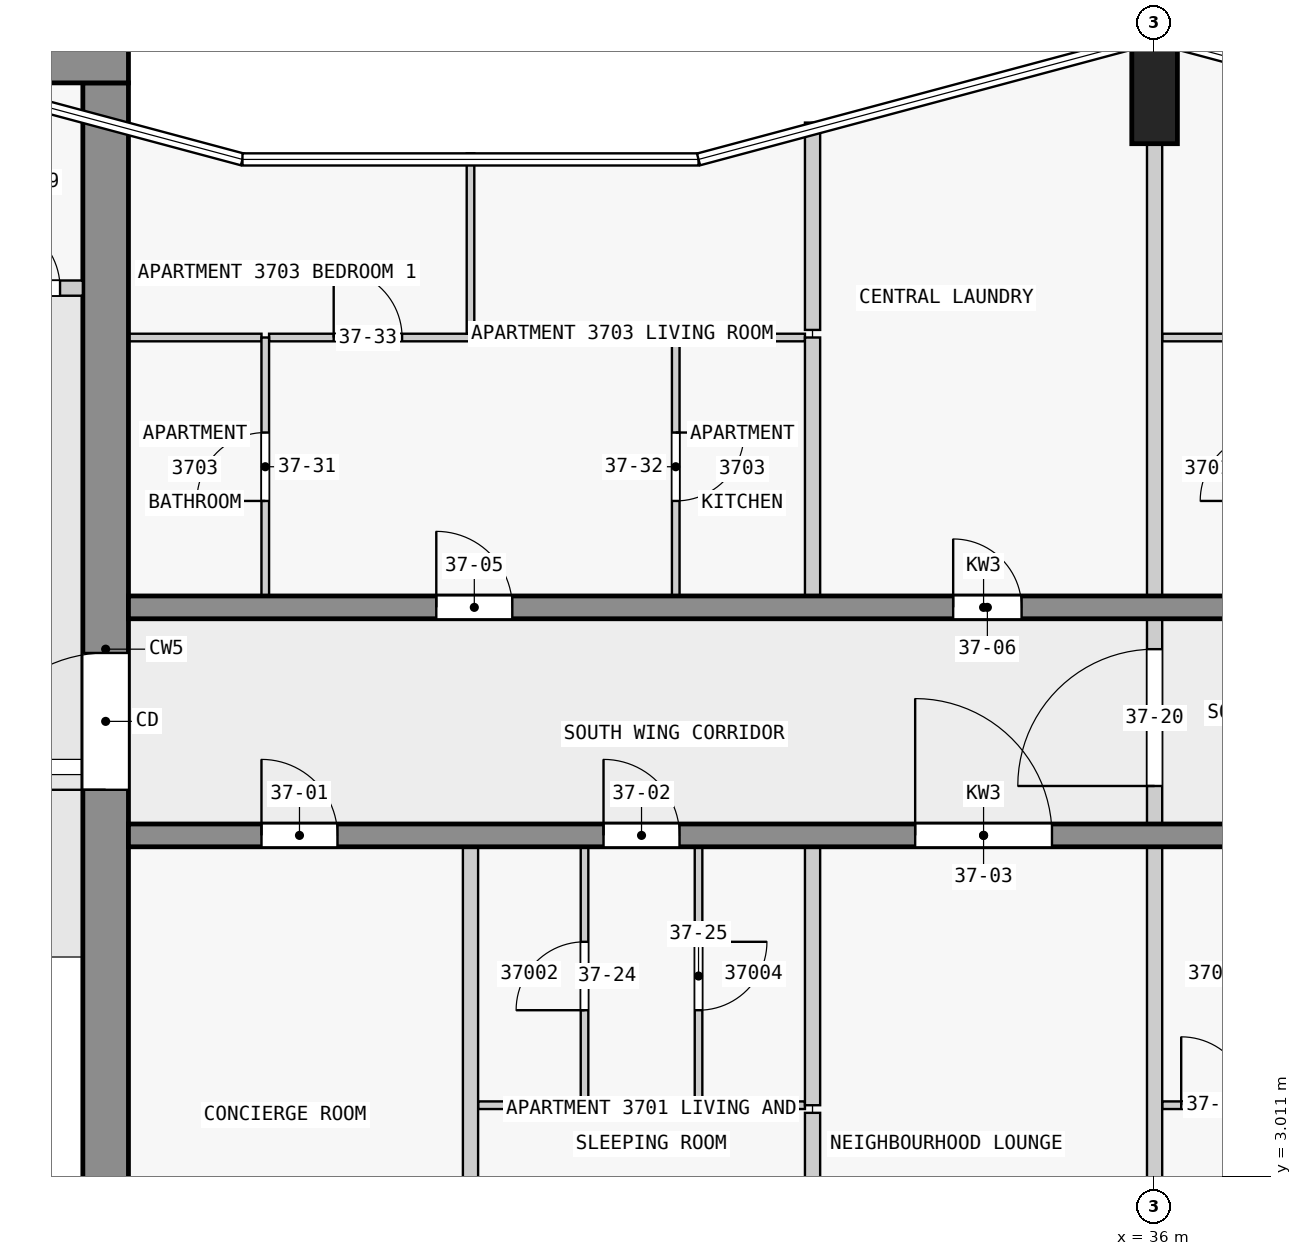
"""IFC4 building model, lengths in metres.
Left out: names, types, materials, properties, quantities, classifications, styles, units other than length and angle.
Written with IfcOpenShell. Run it as: python <this file> out.ifc"""

import sys

from ifc_helpers import new_model, si_unit, direction, frame, frame_2d, origin, origin_2d, place, context, subcontext, project, spatial, rectangle, extrude, element, fill, save


model = new_model("IFC4")
c1 = context("Model", 3, precision=1e-05, world=origin(), true_north=direction((0.0, 1.0)))
c2 = subcontext(c1, "Body", "Model", "MODEL_VIEW")
j1 = project(units=[si_unit("LENGTHUNIT", "METRE"), si_unit("PLANEANGLEUNIT", "RADIAN")], contexts=[c1])
p1 = place(None, origin())
s1 = spatial("IfcSite", under=j1, at=p1, CompositionType="ELEMENT")
p2 = place(p1, origin())
s2 = spatial("IfcBuilding", under=s1, at=p2, CompositionType="ELEMENT")
p3 = place(p2, frame((0.0, 0.0, 146.4)))
s3 = spatial("IfcBuildingStorey", under=s2, at=p3, CompositionType="ELEMENT", Elevation=146.4)
p4 = place(p3, frame((36.0, 17.3, 0.0), z_axis=(0.0, 0.0, 1.0), x_axis=(1.0, 0.0, 0.0)))
e1 = element("IfcColumn", 1, at=p4, inside=s3, PredefinedType="COLUMN", context=c2, shape_type="SweptSolid", body=[
    extrude(rectangle(XDim=0.6, YDim=1.4, at=origin_2d()), origin(), (0.0, 0.0, 1.0), 3.5),
])
p5 = place(p3, frame((1.38, 17.7, 0.0), z_axis=(0.0, 0.0, 1.0), x_axis=(1.0, 0.0, 0.0)))
e2 = element("IfcWall", 2, at=p5, inside=s3, PredefinedType="SHEAR", context=c2, shape_type="SweptSolid", body=[
    extrude(rectangle(XDim=21.12, YDim=0.6, at=frame_2d((10.56, 0.0))), origin(), (0.0, 0.0, 1.0), 3.25),
])
p6 = place(p5, frame((6.4, 0.0, 0.0)))
e3 = element("IfcOpeningElement", 3, at=p6, cuts=e2, PredefinedType="OPENING", context=c2, shape_type="SweptSolid", body=[
    extrude(rectangle(XDim=1.8, YDim=2.1, at=frame_2d((0.9, 1.05))), frame((0.0, 0.31, 0.0), z_axis=(0.0, -1.0, 0.0), x_axis=(1.0, 0.0, 0.0)), (0.0, 0.0, 1.0), 0.62),
])
p7 = place(p3, frame((22.2, 2.5, 0.0), z_axis=(0.0, 0.0, 1.0), x_axis=(0.0, 1.0, 0.0)))
e4 = element("IfcWall", 4, at=p7, inside=s3, PredefinedType="SHEAR", context=c2, shape_type="SweptSolid", body=[
    extrude(rectangle(XDim=14.9, YDim=0.6, at=frame_2d((7.45, 0.0))), origin(), (0.0, 0.0, 1.0), 3.25),
])
p8 = place(p7, frame((5.6, 0.0, 0.0)))
e5 = element("IfcOpeningElement", 5, at=p8, cuts=e4, PredefinedType="OPENING", context=c2, shape_type="SweptSolid", body=[
    extrude(rectangle(XDim=1.8, YDim=2.1, at=frame_2d((0.9, 1.05))), frame((0.0, 0.31, 0.0), z_axis=(0.0, -1.0, 0.0), x_axis=(1.0, 0.0, 0.0)), (0.0, 0.0, 1.0), 0.62),
])
p9 = place(p3, frame((22.5, 7.5, 0.0), z_axis=(0.0, 0.0, 1.0), x_axis=(1.0, 0.0, 0.0)))
e6 = element("IfcWall", 6, at=p9, inside=s3, PredefinedType="SHEAR", context=c2, shape_type="SweptSolid", body=[
    extrude(rectangle(XDim=22.5, YDim=0.3, at=frame_2d((11.25, 0.0))), origin(), (0.0, 0.0, 1.0), 3.25),
])
p10 = place(p9, frame((1.75, 0.0, 0.0)))
e7 = element("IfcOpeningElement", 7, at=p10, cuts=e6, PredefinedType="OPENING", context=c2, shape_type="SweptSolid", body=[
    extrude(rectangle(XDim=1.0, YDim=2.1, at=frame_2d((0.5, 1.05))), frame((0.0, 0.16, 0.0), z_axis=(0.0, -1.0, 0.0), x_axis=(1.0, 0.0, 0.0)), (0.0, 0.0, 1.0), 0.32),
])
p11 = place(p9, frame((6.25, 0.0, 0.0)))
e8 = element("IfcOpeningElement", 8, at=p11, cuts=e6, PredefinedType="OPENING", context=c2, shape_type="SweptSolid", body=[
    extrude(rectangle(XDim=1.0, YDim=2.1, at=frame_2d((0.5, 1.05))), frame((0.0, 0.16, 0.0), z_axis=(0.0, -1.0, 0.0), x_axis=(1.0, 0.0, 0.0)), (0.0, 0.0, 1.0), 0.32),
])
p12 = place(p9, frame((10.35, 0.0, 0.0)))
e9 = element("IfcOpeningElement", 9, at=p12, cuts=e6, PredefinedType="OPENING", context=c2, shape_type="SweptSolid", body=[
    extrude(rectangle(XDim=1.8, YDim=2.1, at=frame_2d((0.9, 1.05))), frame((0.0, 0.16, 0.0), z_axis=(0.0, -1.0, 0.0), x_axis=(1.0, 0.0, 0.0)), (0.0, 0.0, 1.0), 0.32),
])
p13 = place(p9, frame((16.85, 0.0, 0.0)))
e10 = element("IfcOpeningElement", 10, at=p13, cuts=e6, PredefinedType="OPENING", context=c2, shape_type="SweptSolid", body=[
    extrude(rectangle(XDim=1.0, YDim=2.1, at=frame_2d((0.5, 1.05))), frame((0.0, 0.16, 0.0), z_axis=(0.0, -1.0, 0.0), x_axis=(1.0, 0.0, 0.0)), (0.0, 0.0, 1.0), 0.32),
])
p14 = place(p3, frame((22.5, 10.5, 0.0), z_axis=(0.0, 0.0, 1.0), x_axis=(1.0, 0.0, 0.0)))
e11 = element("IfcWall", 11, at=p14, inside=s3, PredefinedType="SHEAR", context=c2, shape_type="SweptSolid", body=[
    extrude(rectangle(XDim=22.5, YDim=0.3, at=frame_2d((11.25, 0.0))), origin(), (0.0, 0.0, 1.0), 3.25),
])
p15 = place(p14, frame((4.05, 0.0, 0.0)))
e12 = element("IfcOpeningElement", 12, at=p15, cuts=e11, PredefinedType="OPENING", context=c2, shape_type="SweptSolid", body=[
    extrude(rectangle(XDim=1.0, YDim=2.1, at=frame_2d((0.5, 1.05))), frame((0.0, 0.16, 0.0), z_axis=(0.0, -1.0, 0.0), x_axis=(1.0, 0.0, 0.0)), (0.0, 0.0, 1.0), 0.32),
])
p16 = place(p14, frame((10.85, 0.0, 0.0)))
e13 = element("IfcOpeningElement", 13, at=p16, cuts=e11, PredefinedType="OPENING", context=c2, shape_type="SweptSolid", body=[
    extrude(rectangle(XDim=0.9, YDim=2.1, at=frame_2d((0.45, 1.05))), frame((0.0, 0.16, 0.0), z_axis=(0.0, -1.0, 0.0), x_axis=(1.0, 0.0, 0.0)), (0.0, 0.0, 1.0), 0.32),
])
p17 = place(p14, frame((15.25, 0.0, 0.0)))
e14 = element("IfcOpeningElement", 14, at=p17, cuts=e11, PredefinedType="OPENING", context=c2, shape_type="SweptSolid", body=[
    extrude(rectangle(XDim=1.0, YDim=2.1, at=frame_2d((0.5, 1.05))), frame((0.0, 0.16, 0.0), z_axis=(0.0, -1.0, 0.0), x_axis=(1.0, 0.0, 0.0)), (0.0, 0.0, 1.0), 0.32),
])
p18 = place(p14, frame((18.75, 0.0, 0.0)))
e15 = element("IfcOpeningElement", 15, at=p18, cuts=e11, PredefinedType="OPENING", context=c2, shape_type="SweptSolid", body=[
    extrude(rectangle(XDim=0.9, YDim=2.1, at=frame_2d((0.45, 1.05))), frame((0.0, 0.16, 0.0), z_axis=(0.0, -1.0, 0.0), x_axis=(1.0, 0.0, 0.0)), (0.0, 0.0, 1.0), 0.32),
])
p19 = place(p14, frame((20.95, 0.0, 0.0)))
e16 = element("IfcOpeningElement", 16, at=p19, cuts=e11, PredefinedType="OPENING", context=c2, shape_type="SweptSolid", body=[
    extrude(rectangle(XDim=1.0, YDim=2.1, at=frame_2d((0.5, 1.05))), frame((0.0, 0.16, 0.0), z_axis=(0.0, -1.0, 0.0), x_axis=(1.0, 0.0, 0.0)), (0.0, 0.0, 1.0), 0.32),
])
p20 = place(p3, frame((18.6, 14.7, 0.0), z_axis=(0.0, 0.0, 1.0), x_axis=(1.0, 0.0, 0.0)))
e17 = element("IfcWall", 17, at=p20, inside=s3, PredefinedType="PARTITIONING", context=c2, shape_type="SweptSolid", body=[
    extrude(rectangle(XDim=3.3, YDim=0.2, at=frame_2d((1.65, 0.0))), origin(), (0.0, 0.0, 1.0), 3.25),
])
p21 = place(p20, frame((0.45, 0.0, 0.0)))
e18 = element("IfcOpeningElement", 18, at=p21, cuts=e17, PredefinedType="OPENING", context=c2, shape_type="SweptSolid", body=[
    extrude(rectangle(XDim=0.9, YDim=2.1, at=frame_2d((0.45, 1.05))), frame((0.0, 0.11, 0.0), z_axis=(0.0, -1.0, 0.0), x_axis=(1.0, 0.0, 0.0)), (0.0, 0.0, 1.0), 0.22),
])
p22 = place(p20, frame((2.1, 0.0, 0.0)))
e19 = element("IfcOpeningElement", 19, at=p22, cuts=e17, PredefinedType="OPENING", context=c2, shape_type="SweptSolid", body=[
    extrude(rectangle(XDim=0.9, YDim=2.1, at=frame_2d((0.45, 1.05))), frame((0.0, 0.11, 0.0), z_axis=(0.0, -1.0, 0.0), x_axis=(1.0, 0.0, 0.0)), (0.0, 0.0, 1.0), 0.22),
])
for number, where, z_axis, x_axis in (
    (20, (27.1, 3.95, 0.0), (0.0, 0.0, 1.0), (1.0, 0.0, 0.0)),
    (21, (30.05, 3.95, 0.0), (0.0, 0.0, 1.0), (1.0, 0.0, 0.0)),
):
    element("IfcWall", number, at=place(p3, frame(where, z_axis=z_axis, x_axis=x_axis)), inside=s3, PredefinedType="PARTITIONING", context=c2, shape_type="SweptSolid", body=[
        extrude(rectangle(XDim=1.35, YDim=0.1, at=frame_2d((0.675, 0.0))), origin(), (0.0, 0.0, 1.0), 3.25),
    ])
p23 = place(p3, frame((36.1, 3.95, 0.0), z_axis=(0.0, 0.0, 1.0), x_axis=(1.0, 0.0, 0.0)))
e22 = element("IfcWall", 22, at=p23, inside=s3, PredefinedType="PARTITIONING", context=c2, shape_type="SweptSolid", body=[
    extrude(rectangle(XDim=1.45, YDim=0.1, at=frame_2d((0.725, 0.0))), origin(), (0.0, 0.0, 1.0), 3.25),
])
p24 = place(p23, frame((0.25, 0.0, 0.0)))
e23 = element("IfcOpeningElement", 23, at=p24, cuts=e22, PredefinedType="OPENING", context=c2, shape_type="SweptSolid", body=[
    extrude(rectangle(XDim=0.9, YDim=2.1, at=frame_2d((0.45, 1.05))), frame((0.0, 0.06, 0.0), z_axis=(0.0, -1.0, 0.0), x_axis=(1.0, 0.0, 0.0)), (0.0, 0.0, 1.0), 0.12),
])
p25 = place(p3, frame((24.25, 14.05, 0.0), z_axis=(0.0, 0.0, 1.0), x_axis=(-1.0, 0.0, 0.0)))
e24 = element("IfcWall", 24, at=p25, inside=s3, PredefinedType="PARTITIONING", context=c2, shape_type="SweptSolid", body=[
    extrude(rectangle(XDim=1.75, YDim=0.1, at=frame_2d((0.875, 0.0))), origin(), (0.0, 0.0, 1.0), 3.25),
])
p26 = place(p3, frame((31.4, 14.05, 0.0), z_axis=(0.0, 0.0, 1.0), x_axis=(-1.0, 0.0, 0.0)))
e25 = element("IfcWall", 25, at=p26, inside=s3, PredefinedType="PARTITIONING", context=c2, shape_type="SweptSolid", body=[
    extrude(rectangle(XDim=1.65, YDim=0.1, at=frame_2d((0.825, 0.0))), origin(), (0.0, 0.0, 1.0), 3.25),
])
p27 = place(p3, frame((37.45, 14.05, 0.0), z_axis=(0.0, 0.0, 1.0), x_axis=(-1.0, 0.0, 0.0)))
e26 = element("IfcWall", 26, at=p27, inside=s3, PredefinedType="PARTITIONING", context=c2, shape_type="SweptSolid", body=[
    extrude(rectangle(XDim=1.35, YDim=0.1, at=frame_2d((0.675, 0.0))), origin(), (0.0, 0.0, 1.0), 3.25),
])
p28 = place(p3, frame((24.35, 14.05, 0.0), z_axis=(0.0, 0.0, 1.0), x_axis=(1.0, 0.0, 0.0)))
e27 = element("IfcWall", 27, at=p28, inside=s3, PredefinedType="PARTITIONING", context=c2, shape_type="SweptSolid", body=[
    extrude(rectangle(XDim=2.65, YDim=0.1, at=frame_2d((1.325, 0.0))), origin(), (0.0, 0.0, 1.0), 3.25),
])
p29 = place(p28, frame((0.85, 0.0, 0.0)))
e28 = element("IfcOpeningElement", 28, at=p29, cuts=e27, PredefinedType="OPENING", context=c2, shape_type="SweptSolid", body=[
    extrude(rectangle(XDim=0.9, YDim=2.1, at=frame_2d((0.45, 1.05))), frame((0.0, 0.06, 0.0), z_axis=(0.0, -1.0, 0.0), x_axis=(1.0, 0.0, 0.0)), (0.0, 0.0, 1.0), 0.12),
])
p30 = place(p3, frame((24.3, 10.65, 0.0), z_axis=(0.0, 0.0, 1.0), x_axis=(0.0, 1.0, 0.0)))
e29 = element("IfcWall", 29, at=p30, inside=s3, PredefinedType="PARTITIONING", context=c2, shape_type="SweptSolid", body=[
    extrude(rectangle(XDim=3.4, YDim=0.1, at=frame_2d((1.7, 0.0))), origin(), (0.0, 0.0, 1.0), 3.25),
])
p31 = place(p30, frame((1.25, 0.0, 0.0)))
e30 = element("IfcOpeningElement", 30, at=p31, cuts=e29, PredefinedType="OPENING", context=c2, shape_type="SweptSolid", body=[
    extrude(rectangle(XDim=0.9, YDim=2.1, at=frame_2d((0.45, 1.05))), frame((0.0, 0.06, 0.0), z_axis=(0.0, -1.0, 0.0), x_axis=(1.0, 0.0, 0.0)), (0.0, 0.0, 1.0), 0.12),
])
p32 = place(p3, frame((27.0, 14.1, 0.0), z_axis=(0.0, 0.0, 1.0), x_axis=(0.0, 1.0, 0.0)))
e31 = element("IfcWall", 31, at=p32, inside=s3, PredefinedType="PARTITIONING", context=c2, shape_type="SweptSolid", body=[
    extrude(rectangle(XDim=2.373, YDim=0.1, at=frame_2d((1.187, 0.0))), origin(), (0.0, 0.0, 1.0), 3.25),
])
p33 = place(p3, frame((27.0, 1.527, 0.0), z_axis=(0.0, 0.0, 1.0), x_axis=(0.0, 1.0, 0.0)))
e32 = element("IfcWall", 32, at=p33, inside=s3, PredefinedType="PARTITIONING", context=c2, shape_type="SweptSolid", body=[
    extrude(rectangle(XDim=5.823, YDim=0.2, at=frame_2d((2.912, 0.0))), origin(), (0.0, 0.0, 1.0), 3.25),
])
p34 = place(p3, frame((28.5, 3.95, 0.0), z_axis=(0.0, 0.0, 1.0), x_axis=(0.0, 1.0, 0.0)))
e33 = element("IfcWall", 33, at=p34, inside=s3, PredefinedType="PARTITIONING", context=c2, shape_type="SweptSolid", body=[
    extrude(rectangle(XDim=3.4, YDim=0.1, at=frame_2d((1.7, 0.0))), origin(), (0.0, 0.0, 1.0), 3.25),
])
p35 = place(p34, frame((1.25, 0.0, 0.0)))
e34 = element("IfcOpeningElement", 34, at=p35, cuts=e33, PredefinedType="OPENING", context=c2, shape_type="SweptSolid", body=[
    extrude(rectangle(XDim=0.9, YDim=2.1, at=frame_2d((0.45, 1.05))), frame((0.0, 0.06, 0.0), z_axis=(0.0, -1.0, 0.0), x_axis=(1.0, 0.0, 0.0)), (0.0, 0.0, 1.0), 0.12),
])
p36 = place(p3, frame((29.7, 14.05, 0.0), z_axis=(0.0, 0.0, 1.0), x_axis=(0.0, -1.0, 0.0)))
e35 = element("IfcWall", 35, at=p36, inside=s3, PredefinedType="PARTITIONING", context=c2, shape_type="SweptSolid", body=[
    extrude(rectangle(XDim=3.4, YDim=0.1, at=frame_2d((1.7, 0.0))), origin(), (0.0, 0.0, 1.0), 3.25),
])
p37 = place(p36, frame((1.25, 0.0, 0.0)))
e36 = element("IfcOpeningElement", 36, at=p37, cuts=e35, PredefinedType="OPENING", context=c2, shape_type="SweptSolid", body=[
    extrude(rectangle(XDim=0.9, YDim=2.1, at=frame_2d((0.45, 1.05))), frame((0.0, 0.06, 0.0), z_axis=(0.0, -1.0, 0.0), x_axis=(1.0, 0.0, 0.0)), (0.0, 0.0, 1.0), 0.12),
])
p38 = place(p3, frame((30.0, 7.35, 0.0), z_axis=(0.0, 0.0, 1.0), x_axis=(0.0, -1.0, 0.0)))
e37 = element("IfcWall", 37, at=p38, inside=s3, PredefinedType="PARTITIONING", context=c2, shape_type="SweptSolid", body=[
    extrude(rectangle(XDim=3.4, YDim=0.1, at=frame_2d((1.7, 0.0))), origin(), (0.0, 0.0, 1.0), 3.25),
])
p39 = place(p38, frame((1.25, 0.0, 0.0)))
e38 = element("IfcOpeningElement", 38, at=p39, cuts=e37, PredefinedType="OPENING", context=c2, shape_type="SweptSolid", body=[
    extrude(rectangle(XDim=0.9, YDim=2.1, at=frame_2d((0.45, 1.05))), frame((0.0, 0.06, 0.0), z_axis=(0.0, -1.0, 0.0), x_axis=(1.0, 0.0, 0.0)), (0.0, 0.0, 1.0), 0.12),
])
for number, where, z_axis, x_axis in (
    (39, (31.5, 3.85, 0.0), (0.0, 0.0, 1.0), (0.0, -1.0, 0.0)),
    (40, (31.5, 16.878, 0.0), (0.0, 0.0, 1.0), (0.0, -1.0, 0.0)),
):
    element("IfcWall", number, at=place(p3, frame(where, z_axis=z_axis, x_axis=x_axis)), inside=s3, PredefinedType="PARTITIONING", context=c2, shape_type="SweptSolid", body=[
        extrude(rectangle(XDim=2.728, YDim=0.2, at=frame_2d((1.364, 0.0))), origin(), (0.0, 0.0, 1.0), 3.25),
    ])
for number, where, z_axis, x_axis in (
    (41, (31.5, 3.95, 0.0), (0.0, 0.0, 1.0), (0.0, 1.0, 0.0)),
    (42, (31.5, 10.65, 0.0), (0.0, 0.0, 1.0), (0.0, 1.0, 0.0)),
):
    element("IfcWall", number, at=place(p3, frame(where, z_axis=z_axis, x_axis=x_axis)), inside=s3, PredefinedType="PARTITIONING", context=c2, shape_type="SweptSolid", body=[
        extrude(rectangle(XDim=3.4, YDim=0.2, at=frame_2d((1.7, 0.0))), origin(), (0.0, 0.0, 1.0), 3.25),
    ])
for number, where, z_axis, x_axis in (
    (43, (36.0, 1.4, 0.0), (0.0, 0.0, 1.0), (0.0, 1.0, 0.0)),
    (44, (36.0, 10.65, 0.0), (0.0, 0.0, 1.0), (0.0, 1.0, 0.0)),
):
    element("IfcWall", number, at=place(p3, frame(where, z_axis=z_axis, x_axis=x_axis)), inside=s3, PredefinedType="PARTITIONING", context=c2, shape_type="SweptSolid", body=[
        extrude(rectangle(XDim=5.95, YDim=0.2, at=frame_2d((2.975, 0.0))), origin(), (0.0, 0.0, 1.0), 3.25),
    ])
p40 = place(p3, frame((36.0, 7.45, 0.0), z_axis=(0.0, 0.0, 1.0), x_axis=(0.0, 1.0, 0.0)))
e45 = element("IfcWall", 45, at=p40, inside=s3, PredefinedType="PARTITIONING", context=c2, shape_type="SweptSolid", body=[
    extrude(rectangle(XDim=3.1, YDim=0.2, at=frame_2d((1.55, 0.0))), origin(), (0.0, 0.0, 1.0), 3.25),
])
p41 = place(p40, frame((0.7, 0.0, 0.0)))
e46 = element("IfcOpeningElement", 46, at=p41, cuts=e45, PredefinedType="OPENING", context=c2, shape_type="SweptSolid", body=[
    extrude(rectangle(XDim=1.8, YDim=2.1, at=frame_2d((0.9, 1.05))), frame((0.0, 0.11, 0.0), z_axis=(0.0, -1.0, 0.0), x_axis=(1.0, 0.0, 0.0)), (0.0, 0.0, 1.0), 0.22),
])
p42 = place(p8, origin())
e47 = element("IfcDoor", 47, at=p42, inside=s3, OperationType="DOUBLE_DOOR_SINGLE_SWING", PredefinedType="DOOR", context=c2, shape_type="SweptSolid", body=[
    extrude(rectangle(XDim=1.8, YDim=2.1, at=frame_2d((0.9, 1.05))), frame((0.0, 0.025, 0.0), z_axis=(0.0, -1.0, 0.0), x_axis=(1.0, 0.0, 0.0)), (0.0, 0.0, 1.0), 0.05),
])
fill(e5, e47)
p43 = place(p22, origin())
e48 = element("IfcDoor", 48, at=p43, inside=s3, OperationType="SINGLE_SWING_LEFT", PredefinedType="DOOR", context=c2, shape_type="SweptSolid", body=[
    extrude(rectangle(XDim=0.9, YDim=2.1, at=frame_2d((0.45, 1.05))), frame((0.0, 0.025, 0.0), z_axis=(0.0, -1.0, 0.0), x_axis=(1.0, 0.0, 0.0)), (0.0, 0.0, 1.0), 0.05),
])
fill(e19, e48)
p44 = place(p10, origin())
e49 = element("IfcDoor", 49, at=p44, inside=s3, OperationType="SINGLE_SWING_LEFT", PredefinedType="DOOR", context=c2, shape_type="SweptSolid", body=[
    extrude(rectangle(XDim=1.0, YDim=2.1, at=frame_2d((0.5, 1.05))), frame((0.0, 0.025, 0.0), z_axis=(0.0, -1.0, 0.0), x_axis=(1.0, 0.0, 0.0)), (0.0, 0.0, 1.0), 0.05),
])
fill(e7, e49)
p45 = place(p11, origin())
e50 = element("IfcDoor", 50, at=p45, inside=s3, OperationType="SINGLE_SWING_LEFT", PredefinedType="DOOR", context=c2, shape_type="SweptSolid", body=[
    extrude(rectangle(XDim=1.0, YDim=2.1, at=frame_2d((0.5, 1.05))), frame((0.0, 0.025, 0.0), z_axis=(0.0, -1.0, 0.0), x_axis=(1.0, 0.0, 0.0)), (0.0, 0.0, 1.0), 0.05),
])
fill(e8, e50)
p46 = place(p12, origin())
e51 = element("IfcDoor", 51, at=p46, inside=s3, OperationType="SINGLE_SWING_LEFT", PredefinedType="DOOR", context=c2, shape_type="SweptSolid", body=[
    extrude(rectangle(XDim=1.8, YDim=2.1, at=frame_2d((0.9, 1.05))), frame((0.0, 0.025, 0.0), z_axis=(0.0, -1.0, 0.0), x_axis=(1.0, 0.0, 0.0)), (0.0, 0.0, 1.0), 0.05),
])
fill(e9, e51)
p47 = place(p15, origin())
e52 = element("IfcDoor", 52, at=p47, inside=s3, OperationType="SINGLE_SWING_LEFT", PredefinedType="DOOR", context=c2, shape_type="SweptSolid", body=[
    extrude(rectangle(XDim=1.0, YDim=2.1, at=frame_2d((0.5, 1.05))), frame((0.0, 0.025, 0.0), z_axis=(0.0, -1.0, 0.0), x_axis=(1.0, 0.0, 0.0)), (0.0, 0.0, 1.0), 0.05),
])
fill(e12, e52)
p48 = place(p16, origin())
e53 = element("IfcDoor", 53, at=p48, inside=s3, OperationType="SINGLE_SWING_RIGHT", PredefinedType="DOOR", context=c2, shape_type="SweptSolid", body=[
    extrude(rectangle(XDim=0.9, YDim=2.1, at=frame_2d((0.45, 1.05))), frame((0.0, 0.025, 0.0), z_axis=(0.0, -1.0, 0.0), x_axis=(1.0, 0.0, 0.0)), (0.0, 0.0, 1.0), 0.05),
])
fill(e13, e53)
p49 = place(p41, origin())
e54 = element("IfcDoor", 54, at=p49, inside=s3, OperationType="SINGLE_SWING_RIGHT", PredefinedType="DOOR", context=c2, shape_type="SweptSolid", body=[
    extrude(rectangle(XDim=1.8, YDim=2.1, at=frame_2d((0.9, 1.05))), frame((0.0, 0.025, 0.0), z_axis=(0.0, -1.0, 0.0), x_axis=(1.0, 0.0, 0.0)), (0.0, 0.0, 1.0), 0.05),
])
fill(e46, e54)
p50 = place(p35, origin())
e55 = element("IfcDoor", 55, at=p50, inside=s3, OperationType="SINGLE_SWING_RIGHT", PredefinedType="DOOR", context=c2, shape_type="SweptSolid", body=[
    extrude(rectangle(XDim=0.9, YDim=2.1, at=frame_2d((0.45, 1.05))), frame((0.0, 0.025, 0.0), z_axis=(0.0, -1.0, 0.0), x_axis=(1.0, 0.0, 0.0)), (0.0, 0.0, 1.0), 0.05),
])
fill(e34, e55)
p51 = place(p39, origin())
e56 = element("IfcDoor", 56, at=p51, inside=s3, OperationType="SINGLE_SWING_RIGHT", PredefinedType="DOOR", context=c2, shape_type="SweptSolid", body=[
    extrude(rectangle(XDim=0.9, YDim=2.1, at=frame_2d((0.45, 1.05))), frame((0.0, 0.025, 0.0), z_axis=(0.0, -1.0, 0.0), x_axis=(1.0, 0.0, 0.0)), (0.0, 0.0, 1.0), 0.05),
])
fill(e38, e56)
p52 = place(p24, origin())
e57 = element("IfcDoor", 57, at=p52, inside=s3, OperationType="SINGLE_SWING_LEFT", PredefinedType="DOOR", context=c2, shape_type="SweptSolid", body=[
    extrude(rectangle(XDim=0.9, YDim=2.1, at=frame_2d((0.45, 1.05))), frame((0.0, 0.025, 0.0), z_axis=(0.0, -1.0, 0.0), x_axis=(1.0, 0.0, 0.0)), (0.0, 0.0, 1.0), 0.05),
])
fill(e23, e57)
p53 = place(p31, origin())
e58 = element("IfcDoor", 58, at=p53, inside=s3, OperationType="SINGLE_SWING_LEFT", PredefinedType="DOOR", context=c2, shape_type="SweptSolid", body=[
    extrude(rectangle(XDim=0.9, YDim=2.1, at=frame_2d((0.45, 1.05))), frame((0.0, 0.025, 0.0), z_axis=(0.0, -1.0, 0.0), x_axis=(1.0, 0.0, 0.0)), (0.0, 0.0, 1.0), 0.05),
])
fill(e30, e58)
p54 = place(p37, origin())
e59 = element("IfcDoor", 59, at=p54, inside=s3, OperationType="SINGLE_SWING_LEFT", PredefinedType="DOOR", context=c2, shape_type="SweptSolid", body=[
    extrude(rectangle(XDim=0.9, YDim=2.1, at=frame_2d((0.45, 1.05))), frame((0.0, 0.025, 0.0), z_axis=(0.0, -1.0, 0.0), x_axis=(1.0, 0.0, 0.0)), (0.0, 0.0, 1.0), 0.05),
])
fill(e36, e59)
p55 = place(p29, origin())
e60 = element("IfcDoor", 60, at=p55, inside=s3, OperationType="SINGLE_SWING_LEFT", PredefinedType="DOOR", context=c2, shape_type="SweptSolid", body=[
    extrude(rectangle(XDim=0.9, YDim=2.1, at=frame_2d((0.45, 1.05))), frame((0.0, 0.025, 0.0), z_axis=(0.0, -1.0, 0.0), x_axis=(1.0, 0.0, 0.0)), (0.0, 0.0, 1.0), 0.05),
])
fill(e28, e60)
save(model, sys.argv[1])
